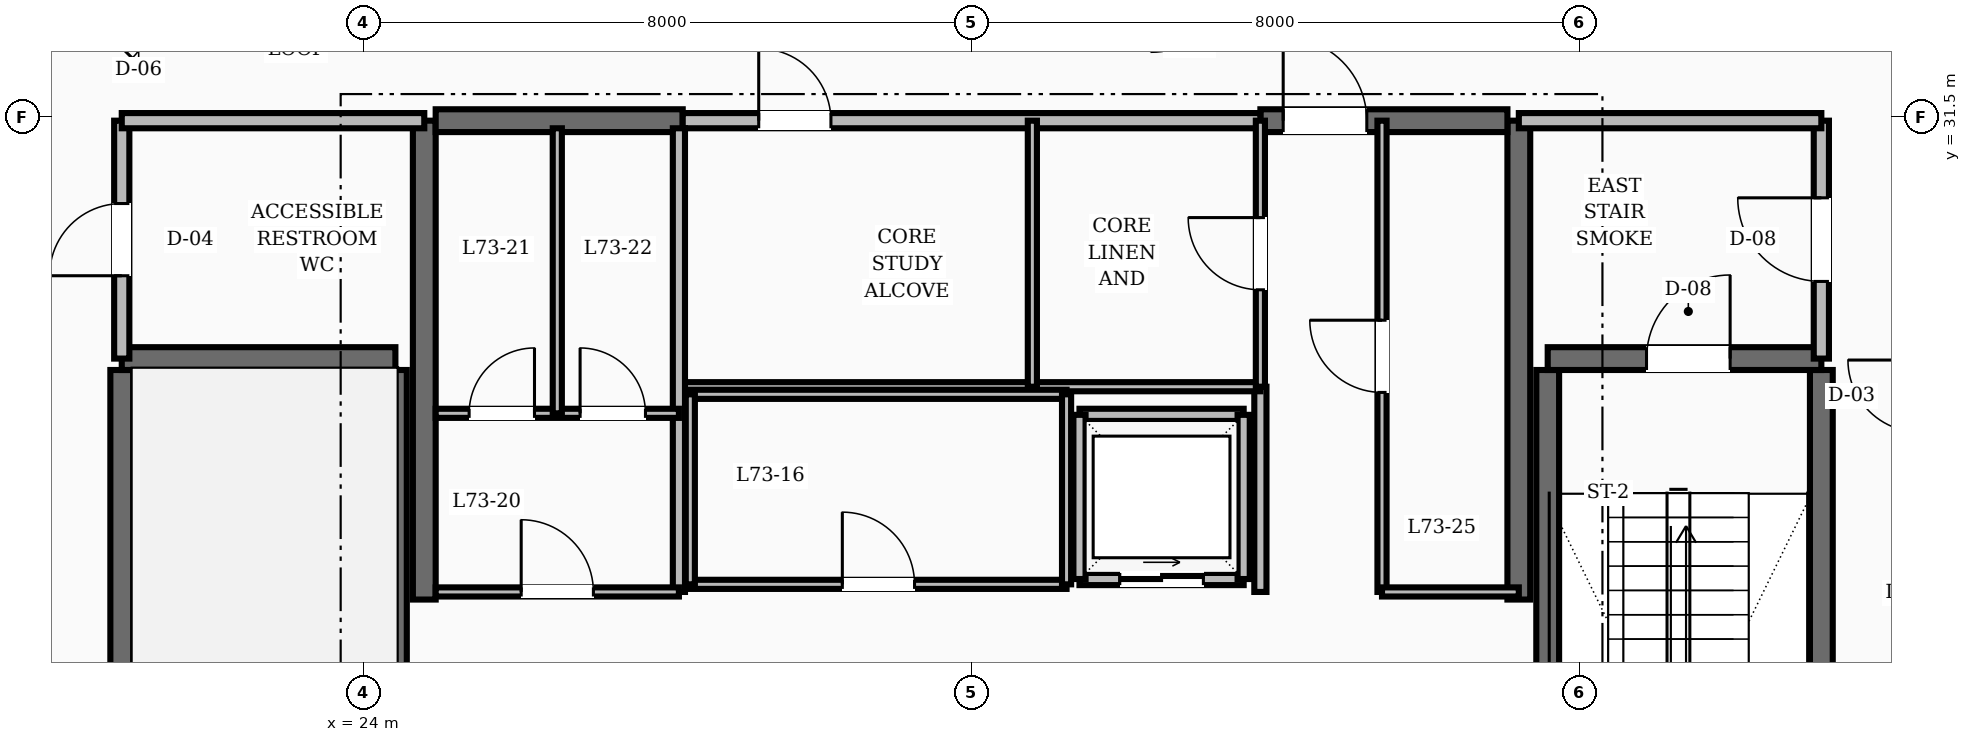
"""IFC4 building model, lengths in metres.
Left out: names, types, materials, properties, quantities, classifications, styles, units other than length and angle.
Written with IfcOpenShell. Run it as: python <this file> out.ifc"""

import sys

from ifc_helpers import new_model, si_unit, direction, frame, frame_2d, origin, place, context, subcontext, project, spatial, rectangle, extrude, element, fill, save


model = new_model("IFC4")
c1 = context("Model", 3, precision=1e-05, world=origin(), true_north=direction((0.0, 1.0)))
c2 = subcontext(c1, "Body", "Model", "MODEL_VIEW")
j1 = project(units=[si_unit("LENGTHUNIT", "METRE"), si_unit("PLANEANGLEUNIT", "RADIAN")], contexts=[c1])
p1 = place(None, origin())
s1 = spatial("IfcSite", under=j1, at=p1, CompositionType="ELEMENT")
p2 = place(p1, origin())
s2 = spatial("IfcBuilding", under=s1, at=p2, CompositionType="ELEMENT")
p3 = place(p2, frame((0.0, 0.0, 279.6)))
s3 = spatial("IfcBuildingStorey", under=s2, at=p3, CompositionType="ELEMENT", Elevation=279.6)
for number, where, z_axis, x_axis in (
    (1, (24.8, 25.15, 0.0), (0.0, 0.0, 1.0), (0.0, 1.0, 0.0)),
    (2, (39.2, 25.15, 0.0), (0.0, 0.0, 1.0), (0.0, 1.0, 0.0)),
):
    element("IfcWall", number, at=place(p3, frame(where, z_axis=z_axis, x_axis=x_axis)), inside=s3, PredefinedType="SHEAR", context=c2, shape_type="SweptSolid", body=[
        extrude(rectangle(XDim=6.3, YDim=0.3, at=frame_2d((3.15, 0.0))), origin(), (0.0, 0.0, 1.0), 3.6),
    ])
p4 = place(p3, frame((24.95, 31.45, 0.0), z_axis=(0.0, 0.0, 1.0), x_axis=(1.0, 0.0, 0.0)))
e3 = element("IfcWall", 3, at=p4, inside=s3, PredefinedType="SHEAR", context=c2, shape_type="SweptSolid", body=[
    extrude(rectangle(XDim=3.25, YDim=0.3, at=frame_2d((1.625, 0.0))), origin(), (0.0, 0.0, 1.0), 3.6),
])
p5 = place(p3, frame((35.8, 31.45, 0.0), z_axis=(0.0, 0.0, 1.0), x_axis=(1.0, 0.0, 0.0)))
e4 = element("IfcWall", 4, at=p5, inside=s3, PredefinedType="SHEAR", context=c2, shape_type="SweptSolid", body=[
    extrude(rectangle(XDim=3.25, YDim=0.3, at=frame_2d((1.625, 0.0))), origin(), (0.0, 0.0, 1.0), 3.6),
])
p6 = place(p5, frame((0.3, 0.0, 0.0)))
e5 = element("IfcOpeningElement", 5, at=p6, cuts=e4, PredefinedType="OPENING", context=c2, shape_type="SweptSolid", body=[
    extrude(rectangle(XDim=1.1, YDim=2.1, at=frame_2d((0.55, 1.05))), frame((0.0, 0.16, 0.0), z_axis=(0.0, -1.0, 0.0), x_axis=(1.0, 0.0, 0.0)), (0.0, 0.0, 1.0), 0.32),
])
for number, where, z_axis, x_axis in (
    (6, (20.82, 19.43, 0.0), (0.0, 0.0, 1.0), (0.0, 1.0, 0.0)),
    (7, (24.42, 19.43, 0.0), (0.0, 0.0, 1.0), (0.0, 1.0, 0.0)),
):
    element("IfcWall", number, at=place(p3, frame(where, z_axis=z_axis, x_axis=x_axis)), inside=s3, PredefinedType="SHEAR", context=c2, shape_type="SweptSolid", body=[
        extrude(rectangle(XDim=8.74, YDim=0.3, at=frame_2d((4.37, 0.0))), origin(), (0.0, 0.0, 1.0), 3.6),
    ])
p7 = place(p3, frame((20.82, 28.32, 0.0), z_axis=(0.0, 0.0, 1.0), x_axis=(1.0, 0.0, 0.0)))
e8 = element("IfcWall", 8, at=p7, inside=s3, PredefinedType="SHEAR", context=c2, shape_type="SweptSolid", body=[
    extrude(rectangle(XDim=3.6, YDim=0.3, at=frame_2d((1.8, 0.0))), origin(), (0.0, 0.0, 1.0), 3.6),
])
for number, where, z_axis, x_axis in (
    (9, (43.18, 19.43, 0.0), (0.0, 0.0, 1.0), (0.0, 1.0, 0.0)),
    (10, (39.58, 19.43, 0.0), (0.0, 0.0, 1.0), (0.0, 1.0, 0.0)),
):
    element("IfcWall", number, at=place(p3, frame(where, z_axis=z_axis, x_axis=x_axis)), inside=s3, PredefinedType="SHEAR", context=c2, shape_type="SweptSolid", body=[
        extrude(rectangle(XDim=8.74, YDim=0.3, at=frame_2d((4.37, 0.0))), origin(), (0.0, 0.0, 1.0), 3.6),
    ])
p8 = place(p3, frame((39.58, 28.32, 0.0), z_axis=(0.0, 0.0, 1.0), x_axis=(1.0, 0.0, 0.0)))
e11 = element("IfcWall", 11, at=p8, inside=s3, PredefinedType="SHEAR", context=c2, shape_type="SweptSolid", body=[
    extrude(rectangle(XDim=3.6, YDim=0.3, at=frame_2d((1.8, 0.0))), origin(), (0.0, 0.0, 1.0), 3.6),
])
p9 = place(p8, frame((1.3, 0.0, 0.0)))
e12 = element("IfcOpeningElement", 12, at=p9, cuts=e11, PredefinedType="OPENING", context=c2, shape_type="SweptSolid", body=[
    extrude(rectangle(XDim=1.1, YDim=2.1, at=frame_2d((0.55, 1.05))), frame((0.0, 0.16, 0.0), z_axis=(0.0, -1.0, 0.0), x_axis=(1.0, 0.0, 0.0)), (0.0, 0.0, 1.0), 0.32),
])
p10 = place(p3, frame((43.18, 28.32, 0.0), z_axis=(0.0, 0.0, 1.0), x_axis=(0.0, 1.0, 0.0)))
e13 = element("IfcWall", 13, at=p10, inside=s3, PredefinedType="SOLIDWALL", context=c2, shape_type="SweptSolid", body=[
    extrude(rectangle(XDim=3.13, YDim=0.2, at=frame_2d((1.565, 0.0))), origin(), (0.0, 0.0, 1.0), 2.87),
])
p11 = place(p10, frame((1.015, 0.0, 0.0)))
e14 = element("IfcOpeningElement", 14, at=p11, cuts=e13, PredefinedType="OPENING", context=c2, shape_type="SweptSolid", body=[
    extrude(rectangle(XDim=1.1, YDim=2.1, at=frame_2d((0.55, 1.05))), frame((0.0, 0.11, 0.0), z_axis=(0.0, -1.0, 0.0), x_axis=(1.0, 0.0, 0.0)), (0.0, 0.0, 1.0), 0.22),
])
p12 = place(p3, frame((39.2, 31.45, 0.0), z_axis=(0.0, 0.0, 1.0), x_axis=(1.0, 0.0, 0.0)))
e15 = element("IfcWall", 15, at=p12, inside=s3, PredefinedType="SOLIDWALL", context=c2, shape_type="SweptSolid", body=[
    extrude(rectangle(XDim=3.98, YDim=0.2, at=frame_2d((1.99, 0.0))), origin(), (0.0, 0.0, 1.0), 2.87),
])
p13 = place(p3, frame((20.82, 28.32, 0.0), z_axis=(0.0, 0.0, 1.0), x_axis=(0.0, 1.0, 0.0)))
e16 = element("IfcWall", 16, at=p13, inside=s3, PredefinedType="SOLIDWALL", context=c2, shape_type="SweptSolid", body=[
    extrude(rectangle(XDim=3.13, YDim=0.2, at=frame_2d((1.565, 0.0))), origin(), (0.0, 0.0, 1.0), 2.87),
])
p14 = place(p13, frame((1.09, 0.0, 0.0)))
e17 = element("IfcOpeningElement", 17, at=p14, cuts=e16, PredefinedType="OPENING", context=c2, shape_type="SweptSolid", body=[
    extrude(rectangle(XDim=0.95, YDim=2.1, at=frame_2d((0.475, 1.05))), frame((0.0, 0.11, 0.0), z_axis=(0.0, -1.0, 0.0), x_axis=(1.0, 0.0, 0.0)), (0.0, 0.0, 1.0), 0.22),
])
p15 = place(p3, frame((20.82, 31.45, 0.0), z_axis=(0.0, 0.0, 1.0), x_axis=(1.0, 0.0, 0.0)))
e18 = element("IfcWall", 18, at=p15, inside=s3, PredefinedType="SOLIDWALL", context=c2, shape_type="SweptSolid", body=[
    extrude(rectangle(XDim=3.98, YDim=0.2, at=frame_2d((1.99, 0.0))), origin(), (0.0, 0.0, 1.0), 2.87),
])
p16 = place(p3, frame((35.8, 25.25, 0.0), z_axis=(0.0, 0.0, 1.0), x_axis=(0.0, 1.0, 0.0)))
e19 = element("IfcWall", 19, at=p16, inside=s3, PredefinedType="SOLIDWALL", context=c2, shape_type="SweptSolid", body=[
    extrude(rectangle(XDim=2.7, YDim=0.16, at=frame_2d((1.35, 0.0))), origin(), (0.0, 0.0, 1.0), 2.87),
])
p17 = place(p3, frame((33.42, 25.42, 0.0), z_axis=(0.0, 0.0, 1.0), x_axis=(1.0, 0.0, 0.0)))
e20 = element("IfcWall", 20, at=p17, inside=s3, PredefinedType="SOLIDWALL", context=c2, shape_type="SweptSolid", body=[
    extrude(rectangle(XDim=2.16, YDim=0.16, at=frame_2d((1.08, 0.0))), origin(), (0.0, 0.0, 1.0), 2.87),
])
p18 = place(p17, frame((0.53, 0.0, 0.0)))
e21 = element("IfcOpeningElement", 21, at=p18, cuts=e20, PredefinedType="OPENING", context=c2, shape_type="SweptSolid", body=[
    extrude(rectangle(XDim=1.1, YDim=2.15, at=frame_2d((0.55, 1.075))), frame((0.0, 0.09, 0.0), z_axis=(0.0, -1.0, 0.0), x_axis=(1.0, 0.0, 0.0)), (0.0, 0.0, 1.0), 0.18),
])
for number, where, z_axis, x_axis in (
    (22, (33.42, 27.58, 0.0), (0.0, 0.0, 1.0), (1.0, 0.0, 0.0)),
    (23, (33.42, 25.42, 0.0), (0.0, 0.0, 1.0), (0.0, 1.0, 0.0)),
    (24, (35.58, 25.42, 0.0), (0.0, 0.0, 1.0), (0.0, 1.0, 0.0)),
):
    element("IfcWall", number, at=place(p3, frame(where, z_axis=z_axis, x_axis=x_axis)), inside=s3, PredefinedType="SOLIDWALL", context=c2, shape_type="SweptSolid", body=[
        extrude(rectangle(XDim=2.16, YDim=0.16, at=frame_2d((1.08, 0.0))), origin(), (0.0, 0.0, 1.0), 2.87),
    ])
p19 = place(p3, frame((28.2, 31.45, 0.0), z_axis=(0.0, 0.0, 1.0), x_axis=(1.0, 0.0, 0.0)))
e25 = element("IfcWall", 25, at=p19, inside=s3, PredefinedType="SOLIDWALL", context=c2, shape_type="SweptSolid", body=[
    extrude(rectangle(XDim=7.6, YDim=0.2, at=frame_2d((3.8, 0.0))), origin(), (0.0, 0.0, 1.0), 2.87),
])
p20 = place(p19, frame((1.0, 0.0, 0.0)))
e26 = element("IfcOpeningElement", 26, at=p20, cuts=e25, PredefinedType="OPENING", context=c2, shape_type="SweptSolid", body=[
    extrude(rectangle(XDim=0.95, YDim=2.1, at=frame_2d((0.475, 1.05))), frame((0.0, 0.11, 0.0), z_axis=(0.0, -1.0, 0.0), x_axis=(1.0, 0.0, 0.0)), (0.0, 0.0, 1.0), 0.22),
])
p21 = place(p3, frame((28.2, 27.95, 0.0), z_axis=(0.0, 0.0, 1.0), x_axis=(1.0, 0.0, 0.0)))
e27 = element("IfcWall", 27, at=p21, inside=s3, PredefinedType="PARTITIONING", context=c2, shape_type="SweptSolid", body=[
    extrude(rectangle(XDim=7.6, YDim=0.12, at=frame_2d((3.8, 0.0))), origin(), (0.0, 0.0, 1.0), 2.87),
])
p22 = place(p3, frame((35.8, 27.95, 0.0), z_axis=(0.0, 0.0, 1.0), x_axis=(0.0, 1.0, 0.0)))
e28 = element("IfcWall", 28, at=p22, inside=s3, PredefinedType="PARTITIONING", context=c2, shape_type="SweptSolid", body=[
    extrude(rectangle(XDim=3.5, YDim=0.12, at=frame_2d((1.75, 0.0))), origin(), (0.0, 0.0, 1.0), 2.87),
])
p23 = place(p22, frame((1.275, 0.0, 0.0)))
e29 = element("IfcOpeningElement", 29, at=p23, cuts=e28, PredefinedType="OPENING", context=c2, shape_type="SweptSolid", body=[
    extrude(rectangle(XDim=0.95, YDim=2.1, at=frame_2d((0.475, 1.05))), frame((0.0, 0.07, 0.0), z_axis=(0.0, -1.0, 0.0), x_axis=(1.0, 0.0, 0.0)), (0.0, 0.0, 1.0), 0.14),
])
p24 = place(p3, frame((32.8, 27.95, 0.0), z_axis=(0.0, 0.0, 1.0), x_axis=(0.0, 1.0, 0.0)))
e30 = element("IfcWall", 30, at=p24, inside=s3, PredefinedType="PARTITIONING", context=c2, shape_type="SweptSolid", body=[
    extrude(rectangle(XDim=3.5, YDim=0.12, at=frame_2d((1.75, 0.0))), origin(), (0.0, 0.0, 1.0), 2.87),
])
p25 = place(p3, frame((28.3, 25.35, 0.0), z_axis=(0.0, 0.0, 1.0), x_axis=(1.0, 0.0, 0.0)))
e31 = element("IfcWall", 31, at=p25, inside=s3, PredefinedType="PARTITIONING", context=c2, shape_type="SweptSolid", body=[
    extrude(rectangle(XDim=4.95, YDim=0.12, at=frame_2d((2.475, 0.0))), origin(), (0.0, 0.0, 1.0), 2.87),
])
p26 = place(p25, frame((2.0, 0.0, 0.0)))
e32 = element("IfcOpeningElement", 32, at=p26, cuts=e31, PredefinedType="OPENING", context=c2, shape_type="SweptSolid", body=[
    extrude(rectangle(XDim=0.95, YDim=2.1, at=frame_2d((0.475, 1.05))), frame((0.0, 0.07, 0.0), z_axis=(0.0, -1.0, 0.0), x_axis=(1.0, 0.0, 0.0)), (0.0, 0.0, 1.0), 0.14),
])
p27 = place(p3, frame((28.3, 27.85, 0.0), z_axis=(0.0, 0.0, 1.0), x_axis=(1.0, 0.0, 0.0)))
e33 = element("IfcWall", 33, at=p27, inside=s3, PredefinedType="PARTITIONING", context=c2, shape_type="SweptSolid", body=[
    extrude(rectangle(XDim=4.95, YDim=0.12, at=frame_2d((2.475, 0.0))), origin(), (0.0, 0.0, 1.0), 2.87),
])
for number, where, z_axis, x_axis in (
    (34, (28.3, 25.35, 0.0), (0.0, 0.0, 1.0), (0.0, 1.0, 0.0)),
    (35, (33.25, 25.35, 0.0), (0.0, 0.0, 1.0), (0.0, 1.0, 0.0)),
):
    element("IfcWall", number, at=place(p3, frame(where, z_axis=z_axis, x_axis=x_axis)), inside=s3, PredefinedType="PARTITIONING", context=c2, shape_type="SweptSolid", body=[
        extrude(rectangle(XDim=2.5, YDim=0.12, at=frame_2d((1.25, 0.0))), origin(), (0.0, 0.0, 1.0), 2.87),
    ])
p28 = place(p3, frame((28.15, 25.25, 0.0), z_axis=(0.0, 0.0, 1.0), x_axis=(0.0, 1.0, 0.0)))
e36 = element("IfcWall", 36, at=p28, inside=s3, PredefinedType="SOLIDWALL", context=c2, shape_type="SweptSolid", body=[
    extrude(rectangle(XDim=6.1, YDim=0.16, at=frame_2d((3.05, 0.0))), origin(), (0.0, 0.0, 1.0), 2.87),
])
p29 = place(p3, frame((24.95, 25.25, 0.0), z_axis=(0.0, 0.0, 1.0), x_axis=(1.0, 0.0, 0.0)))
e37 = element("IfcWall", 37, at=p29, inside=s3, PredefinedType="PARTITIONING", context=c2, shape_type="SweptSolid", body=[
    extrude(rectangle(XDim=3.2, YDim=0.12, at=frame_2d((1.6, 0.0))), origin(), (0.0, 0.0, 1.0), 2.87),
])
p30 = place(p29, frame((1.125, 0.0, 0.0)))
e38 = element("IfcOpeningElement", 38, at=p30, cuts=e37, PredefinedType="OPENING", context=c2, shape_type="SweptSolid", body=[
    extrude(rectangle(XDim=0.95, YDim=2.1, at=frame_2d((0.475, 1.05))), frame((0.0, 0.07, 0.0), z_axis=(0.0, -1.0, 0.0), x_axis=(1.0, 0.0, 0.0)), (0.0, 0.0, 1.0), 0.14),
])
p31 = place(p3, frame((37.4, 25.25, 0.0), z_axis=(0.0, 0.0, 1.0), x_axis=(0.0, 1.0, 0.0)))
e39 = element("IfcWall", 39, at=p31, inside=s3, PredefinedType="PARTITIONING", context=c2, shape_type="SweptSolid", body=[
    extrude(rectangle(XDim=6.2, YDim=0.12, at=frame_2d((3.1, 0.0))), origin(), (0.0, 0.0, 1.0), 2.87),
])
p32 = place(p31, frame((2.625, 0.0, 0.0)))
e40 = element("IfcOpeningElement", 40, at=p32, cuts=e39, PredefinedType="OPENING", context=c2, shape_type="SweptSolid", body=[
    extrude(rectangle(XDim=0.95, YDim=2.1, at=frame_2d((0.475, 1.05))), frame((0.0, 0.07, 0.0), z_axis=(0.0, -1.0, 0.0), x_axis=(1.0, 0.0, 0.0)), (0.0, 0.0, 1.0), 0.14),
])
p33 = place(p3, frame((37.4, 25.25, 0.0), z_axis=(0.0, 0.0, 1.0), x_axis=(1.0, 0.0, 0.0)))
e41 = element("IfcWall", 41, at=p33, inside=s3, PredefinedType="PARTITIONING", context=c2, shape_type="SweptSolid", body=[
    extrude(rectangle(XDim=1.8, YDim=0.12, at=frame_2d((0.9, 0.0))), origin(), (0.0, 0.0, 1.0), 2.87),
])
p34 = place(p3, frame((24.95, 27.6, 0.0), z_axis=(0.0, 0.0, 1.0), x_axis=(1.0, 0.0, 0.0)))
e42 = element("IfcWall", 42, at=p34, inside=s3, PredefinedType="PARTITIONING", context=c2, shape_type="SweptSolid", body=[
    extrude(rectangle(XDim=3.2, YDim=0.12, at=frame_2d((1.6, 0.0))), origin(), (0.0, 0.0, 1.0), 2.87),
])
p35 = place(p34, frame((0.44, 0.0, 0.0)))
e43 = element("IfcOpeningElement", 43, at=p35, cuts=e42, PredefinedType="OPENING", context=c2, shape_type="SweptSolid", body=[
    extrude(rectangle(XDim=0.86, YDim=2.1, at=frame_2d((0.43, 1.05))), frame((0.0, 0.07, 0.0), z_axis=(0.0, -1.0, 0.0), x_axis=(1.0, 0.0, 0.0)), (0.0, 0.0, 1.0), 0.14),
])
p36 = place(p34, frame((1.9, 0.0, 0.0)))
e44 = element("IfcOpeningElement", 44, at=p36, cuts=e42, PredefinedType="OPENING", context=c2, shape_type="SweptSolid", body=[
    extrude(rectangle(XDim=0.86, YDim=2.1, at=frame_2d((0.43, 1.05))), frame((0.0, 0.07, 0.0), z_axis=(0.0, -1.0, 0.0), x_axis=(1.0, 0.0, 0.0)), (0.0, 0.0, 1.0), 0.14),
])
p37 = place(p3, frame((26.55, 27.6, 0.0), z_axis=(0.0, 0.0, 1.0), x_axis=(0.0, 1.0, 0.0)))
e45 = element("IfcWall", 45, at=p37, inside=s3, PredefinedType="PARTITIONING", context=c2, shape_type="SweptSolid", body=[
    extrude(rectangle(XDim=3.75, YDim=0.12, at=frame_2d((1.875, 0.0))), origin(), (0.0, 0.0, 1.0), 2.87),
])
p38 = place(p3, frame((44.427, 32.303, 0.0), z_axis=(0.0, 0.0, 1.0), x_axis=(-0.707106781187, 0.707106781187, 0.0)))
e46 = element("IfcWall", 46, at=p38, inside=s3, PredefinedType="SOLIDWALL", context=c2, shape_type="SweptSolid", body=[
    extrude(rectangle(XDim=2.916, YDim=0.16, at=frame_2d((1.458, 0.0))), origin(), (0.0, 0.0, 1.0), 2.87),
])
p39 = place(p3, frame((21.635, 34.365, 0.0), z_axis=(0.0, 0.0, 1.0), x_axis=(-0.707106781187, -0.707106781187, 0.0)))
e47 = element("IfcWall", 47, at=p39, inside=s3, PredefinedType="SOLIDWALL", context=c2, shape_type="SweptSolid", body=[
    extrude(rectangle(XDim=2.916, YDim=0.16, at=frame_2d((1.458, 0.0))), origin(), (0.0, 0.0, 1.0), 2.87),
])
p40 = place(p39, frame((0.958, 0.0, 0.0)))
e48 = element("IfcOpeningElement", 48, at=p40, cuts=e47, PredefinedType="OPENING", context=c2, shape_type="SweptSolid", body=[
    extrude(rectangle(XDim=1.0, YDim=2.1, at=frame_2d((0.5, 1.05))), frame((0.0, 0.09, 0.0), z_axis=(0.0, -1.0, 0.0), x_axis=(1.0, 0.0, 0.0)), (0.0, 0.0, 1.0), 0.18),
])
p41 = place(p9, origin())
e49 = element("IfcDoor", 49, at=p41, inside=s3, OperationType="SINGLE_SWING_RIGHT", PredefinedType="DOOR", context=c2, shape_type="SweptSolid", body=[
    extrude(rectangle(XDim=1.1, YDim=2.1, at=frame_2d((0.55, 1.05))), frame((0.0, 0.025, 0.0), z_axis=(0.0, -1.0, 0.0), x_axis=(1.0, 0.0, 0.0)), (0.0, 0.0, 1.0), 0.05),
])
fill(e12, e49)
p42 = place(p11, origin())
e50 = element("IfcDoor", 50, at=p42, inside=s3, OperationType="SINGLE_SWING_RIGHT", PredefinedType="DOOR", context=c2, shape_type="SweptSolid", body=[
    extrude(rectangle(XDim=1.1, YDim=2.1, at=frame_2d((0.55, 1.05))), frame((0.0, 0.025, 0.0), z_axis=(0.0, -1.0, 0.0), x_axis=(1.0, 0.0, 0.0)), (0.0, 0.0, 1.0), 0.05),
])
fill(e14, e50)
p43 = place(p14, origin())
e51 = element("IfcDoor", 51, at=p43, inside=s3, OperationType="SINGLE_SWING_LEFT", PredefinedType="DOOR", context=c2, shape_type="SweptSolid", body=[
    extrude(rectangle(XDim=0.95, YDim=2.1, at=frame_2d((0.475, 1.05))), frame((0.0, 0.025, 0.0), z_axis=(0.0, -1.0, 0.0), x_axis=(1.0, 0.0, 0.0)), (0.0, 0.0, 1.0), 0.05),
])
fill(e17, e51)
p44 = place(p6, origin())
e52 = element("IfcDoor", 52, at=p44, inside=s3, OperationType="SINGLE_SWING_LEFT", PredefinedType="DOOR", context=c2, shape_type="SweptSolid", body=[
    extrude(rectangle(XDim=1.1, YDim=2.1, at=frame_2d((0.55, 1.05))), frame((0.0, 0.025, 0.0), z_axis=(0.0, -1.0, 0.0), x_axis=(1.0, 0.0, 0.0)), (0.0, 0.0, 1.0), 0.05),
])
fill(e5, e52)
p45 = place(p18, origin())
e53 = element("IfcDoor", 53, at=p45, inside=s3, OperationType="SLIDING_TO_RIGHT", PredefinedType="DOOR", context=c2, shape_type="SweptSolid", body=[
    extrude(rectangle(XDim=1.1, YDim=2.15, at=frame_2d((0.55, 1.075))), frame((0.0, 0.025, 0.0), z_axis=(0.0, -1.0, 0.0), x_axis=(1.0, 0.0, 0.0)), (0.0, 0.0, 1.0), 0.05),
])
fill(e21, e53)
p46 = place(p20, origin())
e54 = element("IfcDoor", 54, at=p46, inside=s3, OperationType="SINGLE_SWING_LEFT", PredefinedType="DOOR", context=c2, shape_type="SweptSolid", body=[
    extrude(rectangle(XDim=0.95, YDim=2.1, at=frame_2d((0.475, 1.05))), frame((0.0, 0.025, 0.0), z_axis=(0.0, -1.0, 0.0), x_axis=(1.0, 0.0, 0.0)), (0.0, 0.0, 1.0), 0.05),
])
fill(e26, e54)
p47 = place(p23, origin())
e55 = element("IfcDoor", 55, at=p47, inside=s3, OperationType="SINGLE_SWING_RIGHT", PredefinedType="DOOR", context=c2, shape_type="SweptSolid", body=[
    extrude(rectangle(XDim=0.95, YDim=2.1, at=frame_2d((0.475, 1.05))), frame((0.0, 0.025, 0.0), z_axis=(0.0, -1.0, 0.0), x_axis=(1.0, 0.0, 0.0)), (0.0, 0.0, 1.0), 0.05),
])
fill(e29, e55)
p48 = place(p26, origin())
e56 = element("IfcDoor", 56, at=p48, inside=s3, OperationType="SINGLE_SWING_LEFT", PredefinedType="DOOR", context=c2, shape_type="SweptSolid", body=[
    extrude(rectangle(XDim=0.95, YDim=2.1, at=frame_2d((0.475, 1.05))), frame((0.0, 0.025, 0.0), z_axis=(0.0, -1.0, 0.0), x_axis=(1.0, 0.0, 0.0)), (0.0, 0.0, 1.0), 0.05),
])
fill(e32, e56)
p49 = place(p30, origin())
e57 = element("IfcDoor", 57, at=p49, inside=s3, OperationType="SINGLE_SWING_LEFT", PredefinedType="DOOR", context=c2, shape_type="SweptSolid", body=[
    extrude(rectangle(XDim=0.95, YDim=2.1, at=frame_2d((0.475, 1.05))), frame((0.0, 0.025, 0.0), z_axis=(0.0, -1.0, 0.0), x_axis=(1.0, 0.0, 0.0)), (0.0, 0.0, 1.0), 0.05),
])
fill(e38, e57)
p50 = place(p35, origin())
e58 = element("IfcDoor", 58, at=p50, inside=s3, OperationType="SINGLE_SWING_RIGHT", PredefinedType="DOOR", context=c2, shape_type="SweptSolid", body=[
    extrude(rectangle(XDim=0.86, YDim=2.1, at=frame_2d((0.43, 1.05))), frame((0.0, 0.025, 0.0), z_axis=(0.0, -1.0, 0.0), x_axis=(1.0, 0.0, 0.0)), (0.0, 0.0, 1.0), 0.05),
])
fill(e43, e58)
p51 = place(p36, origin())
e59 = element("IfcDoor", 59, at=p51, inside=s3, OperationType="SINGLE_SWING_LEFT", PredefinedType="DOOR", context=c2, shape_type="SweptSolid", body=[
    extrude(rectangle(XDim=0.86, YDim=2.1, at=frame_2d((0.43, 1.05))), frame((0.0, 0.025, 0.0), z_axis=(0.0, -1.0, 0.0), x_axis=(1.0, 0.0, 0.0)), (0.0, 0.0, 1.0), 0.05),
])
fill(e44, e59)
p52 = place(p32, origin())
e60 = element("IfcDoor", 60, at=p52, inside=s3, OperationType="SINGLE_SWING_RIGHT", PredefinedType="DOOR", context=c2, shape_type="SweptSolid", body=[
    extrude(rectangle(XDim=0.95, YDim=2.1, at=frame_2d((0.475, 1.05))), frame((0.0, 0.025, 0.0), z_axis=(0.0, -1.0, 0.0), x_axis=(1.0, 0.0, 0.0)), (0.0, 0.0, 1.0), 0.05),
])
fill(e40, e60)
save(model, sys.argv[1])
